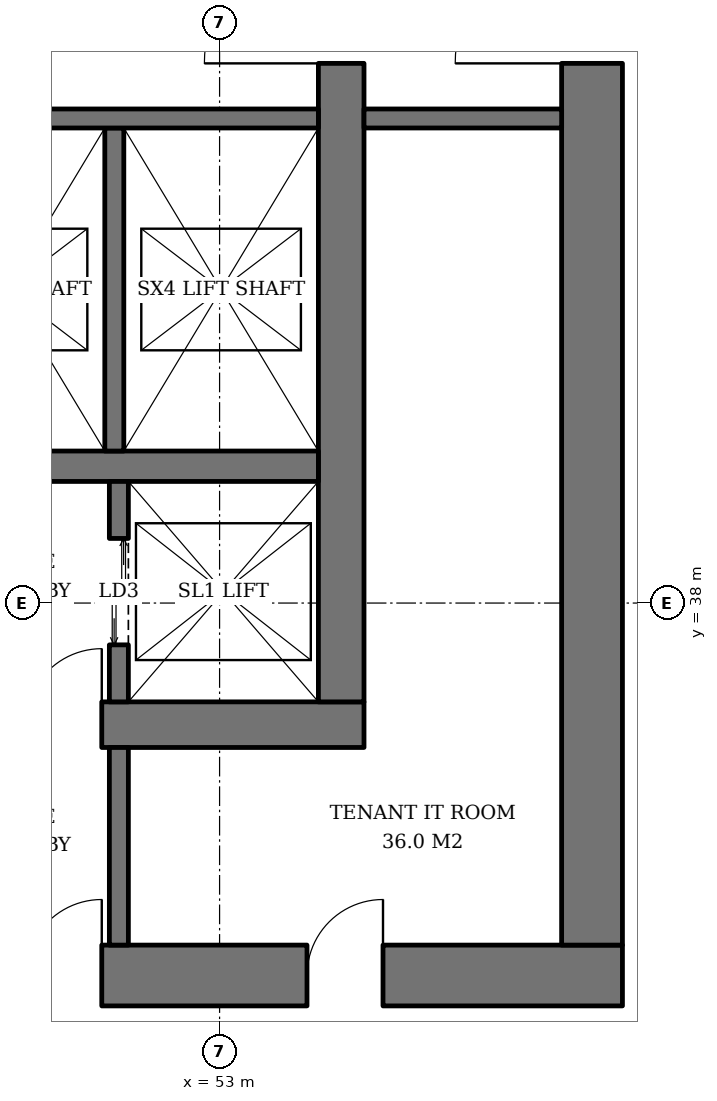
"""IFC4 building model, lengths in metres.
Left out: names, types, materials, properties, quantities, classifications, styles, units other than length and angle.
Written with IfcOpenShell. Run it as: python <this file> out.ifc"""

import sys

from ifc_helpers import new_model, si_unit, direction, frame, frame_2d, origin, place, context, subcontext, project, spatial, rectangle, extrude, element, fill, save


model = new_model("IFC4")
c1 = context("Model", 3, precision=1e-05, world=origin(), true_north=direction((0.0, 1.0)))
c2 = subcontext(c1, "Body", "Model", "MODEL_VIEW")
j1 = project(units=[si_unit("LENGTHUNIT", "METRE"), si_unit("PLANEANGLEUNIT", "RADIAN")], contexts=[c1])
p1 = place(None, origin())
s1 = spatial("IfcSite", under=j1, at=p1, CompositionType="ELEMENT")
p2 = place(p1, origin())
s2 = spatial("IfcBuilding", under=s1, at=p2, CompositionType="ELEMENT")
p3 = place(p2, frame((0.0, 0.0, 36.2)))
s3 = spatial("IfcBuildingStorey", under=s2, at=p3, CompositionType="ELEMENT", Elevation=36.2)
p4 = place(p3, frame((35.1, 36.4, 0.0), z_axis=(0.0, 0.0, 1.0), x_axis=(1.0, 0.0, 0.0)))
e1 = element("IfcWall", 1, at=p4, inside=s3, PredefinedType="SHEAR", context=c2, shape_type="SweptSolid", body=[
    extrude(rectangle(XDim=19.8, YDim=0.6, at=frame_2d((9.9, 0.0))), origin(), (0.0, 0.0, 1.0), 3.8),
])
p5 = place(p4, frame((3.9, 0.0, 0.0)))
e2 = element("IfcOpeningElement", 2, at=p5, cuts=e1, PredefinedType="OPENING", context=c2, shape_type="SweptSolid", body=[
    extrude(rectangle(XDim=1.0, YDim=2.1, at=frame_2d((0.5, 1.05))), frame((0.0, 0.31, 0.0), z_axis=(0.0, -1.0, 0.0), x_axis=(1.0, 0.0, 0.0)), (0.0, 0.0, 1.0), 0.62),
])
p6 = place(p4, frame((15.35, 0.0, 0.0)))
e3 = element("IfcOpeningElement", 3, at=p6, cuts=e1, PredefinedType="OPENING", context=c2, shape_type="SweptSolid", body=[
    extrude(rectangle(XDim=1.0, YDim=2.1, at=frame_2d((0.5, 1.05))), frame((0.0, 0.31, 0.0), z_axis=(0.0, -1.0, 0.0), x_axis=(1.0, 0.0, 0.0)), (0.0, 0.0, 1.0), 0.62),
])
p7 = place(p3, frame((54.6, 36.7, 0.0), z_axis=(0.0, 0.0, 1.0), x_axis=(0.0, 1.0, 0.0)))
e4 = element("IfcWall", 4, at=p7, inside=s3, PredefinedType="SHEAR", context=c2, shape_type="SweptSolid", body=[
    extrude(rectangle(XDim=18.6, YDim=0.6, at=frame_2d((9.3, 0.0))), origin(), (0.0, 0.0, 1.0), 3.8),
])
p8 = place(p7, frame((8.4, 0.0, 0.0)))
e5 = element("IfcOpeningElement", 5, at=p8, cuts=e4, PredefinedType="OPENING", context=c2, shape_type="SweptSolid", body=[
    extrude(rectangle(XDim=1.8, YDim=2.4, at=frame_2d((0.9, 1.2))), frame((0.0, 0.31, 0.0), z_axis=(0.0, -1.0, 0.0), x_axis=(1.0, 0.0, 0.0)), (0.0, 0.0, 1.0), 0.62),
])
p9 = place(p3, frame((31.7, 33.1, 0.0), z_axis=(0.0, 0.0, 1.0), x_axis=(1.0, 0.0, 0.0)))
e6 = element("IfcWall", 6, at=p9, inside=s3, PredefinedType="SHEAR", context=c2, shape_type="SweptSolid", body=[
    extrude(rectangle(XDim=26.6, YDim=0.8, at=frame_2d((13.3, 0.0))), origin(), (0.0, 0.0, 1.0), 3.8),
])
p10 = place(p9, frame((7.3, 0.0, 0.0)))
e7 = element("IfcOpeningElement", 7, at=p10, cuts=e6, PredefinedType="OPENING", context=c2, shape_type="SweptSolid", body=[
    extrude(rectangle(XDim=1.0, YDim=2.1, at=frame_2d((0.5, 1.05))), frame((0.0, 0.41, 0.0), z_axis=(0.0, -1.0, 0.0), x_axis=(1.0, 0.0, 0.0)), (0.0, 0.0, 1.0), 0.82),
])
p11 = place(p9, frame((18.75, 0.0, 0.0)))
e8 = element("IfcOpeningElement", 8, at=p11, cuts=e6, PredefinedType="OPENING", context=c2, shape_type="SweptSolid", body=[
    extrude(rectangle(XDim=1.0, YDim=2.1, at=frame_2d((0.5, 1.05))), frame((0.0, 0.41, 0.0), z_axis=(0.0, -1.0, 0.0), x_axis=(1.0, 0.0, 0.0)), (0.0, 0.0, 1.0), 0.82),
])
p12 = place(p9, frame((3.25, 0.0, 0.0)))
e9 = element("IfcOpeningElement", 9, at=p12, cuts=e6, PredefinedType="OPENING", context=c2, shape_type="SweptSolid", body=[
    extrude(rectangle(XDim=1.0, YDim=2.1, at=frame_2d((0.5, 1.05))), frame((0.0, 0.41, 0.0), z_axis=(0.0, -1.0, 0.0), x_axis=(1.0, 0.0, 0.0)), (0.0, 0.0, 1.0), 0.82),
])
p13 = place(p9, frame((10.42, 0.0, 0.0)))
e10 = element("IfcOpeningElement", 10, at=p13, cuts=e6, PredefinedType="OPENING", context=c2, shape_type="SweptSolid", body=[
    extrude(rectangle(XDim=1.0, YDim=2.1, at=frame_2d((0.5, 1.05))), frame((0.0, 0.41, 0.0), z_axis=(0.0, -1.0, 0.0), x_axis=(1.0, 0.0, 0.0)), (0.0, 0.0, 1.0), 0.82),
])
p14 = place(p9, frame((14.46, 0.0, 0.0)))
e11 = element("IfcOpeningElement", 11, at=p14, cuts=e6, PredefinedType="OPENING", context=c2, shape_type="SweptSolid", body=[
    extrude(rectangle(XDim=1.0, YDim=2.1, at=frame_2d((0.5, 1.05))), frame((0.0, 0.41, 0.0), z_axis=(0.0, -1.0, 0.0), x_axis=(1.0, 0.0, 0.0)), (0.0, 0.0, 1.0), 0.82),
])
p15 = place(p9, frame((22.45, 0.0, 0.0)))
e12 = element("IfcOpeningElement", 12, at=p15, cuts=e6, PredefinedType="OPENING", context=c2, shape_type="SweptSolid", body=[
    extrude(rectangle(XDim=1.0, YDim=2.1, at=frame_2d((0.5, 1.05))), frame((0.0, 0.41, 0.0), z_axis=(0.0, -1.0, 0.0), x_axis=(1.0, 0.0, 0.0)), (0.0, 0.0, 1.0), 0.82),
])
p16 = place(p3, frame((57.9, 33.5, 0.0), z_axis=(0.0, 0.0, 1.0), x_axis=(0.0, 1.0, 0.0)))
e13 = element("IfcWall", 13, at=p16, inside=s3, PredefinedType="SHEAR", context=c2, shape_type="SweptSolid", body=[
    extrude(rectangle(XDim=25.0, YDim=0.8, at=frame_2d((12.5, 0.0))), origin(), (0.0, 0.0, 1.0), 3.8),
])
p17 = place(p16, frame((11.6, 0.0, 0.0)))
e14 = element("IfcOpeningElement", 14, at=p17, cuts=e13, PredefinedType="OPENING", context=c2, shape_type="SweptSolid", body=[
    extrude(rectangle(XDim=1.8, YDim=2.4, at=frame_2d((0.9, 1.2))), frame((0.0, 0.41, 0.0), z_axis=(0.0, -1.0, 0.0), x_axis=(1.0, 0.0, 0.0)), (0.0, 0.0, 1.0), 0.82),
])
p18 = place(p3, frame((35.7, 39.8, 0.0), z_axis=(0.0, 0.0, 1.0), x_axis=(1.0, 0.0, 0.0)))
e15 = element("IfcWall", 15, at=p18, inside=s3, PredefinedType="SHEAR", context=c2, shape_type="SweptSolid", body=[
    extrude(rectangle(XDim=18.6, YDim=0.4, at=frame_2d((9.3, 0.0))), origin(), (0.0, 0.0, 1.0), 3.8),
])
p19 = place(p3, frame((51.675, 36.7, 0.0), z_axis=(0.0, 0.0, 1.0), x_axis=(0.0, 1.0, 0.0)))
e16 = element("IfcWall", 16, at=p19, inside=s3, PredefinedType="SHEAR", context=c2, shape_type="SweptSolid", body=[
    extrude(rectangle(XDim=2.9, YDim=0.25, at=frame_2d((1.45, 0.0))), origin(), (0.0, 0.0, 1.0), 3.8),
])
p20 = place(p19, frame((0.75, 0.0, 0.0)))
e17 = element("IfcOpeningElement", 17, at=p20, cuts=e16, PredefinedType="OPENING", context=c2, shape_type="SweptSolid", body=[
    extrude(rectangle(XDim=1.4, YDim=2.4, at=frame_2d((0.7, 1.2))), frame((0.0, 0.135, 0.0), z_axis=(0.0, -1.0, 0.0), x_axis=(1.0, 0.0, 0.0)), (0.0, 0.0, 1.0), 0.27),
])
p21 = place(p3, frame((51.615, 44.25, 0.0), z_axis=(0.0, 0.0, 1.0), x_axis=(0.0, -1.0, 0.0)))
e18 = element("IfcWall", 18, at=p21, inside=s3, PredefinedType="SHEAR", context=c2, shape_type="SweptSolid", body=[
    extrude(rectangle(XDim=4.25, YDim=0.25, at=frame_2d((2.125, 0.0))), origin(), (0.0, 0.0, 1.0), 3.8),
])
p22 = place(p3, frame((48.93, 44.375, 0.0), z_axis=(0.0, 0.0, 1.0), x_axis=(1.0, 0.0, 0.0)))
e19 = element("IfcWall", 19, at=p22, inside=s3, PredefinedType="SHEAR", context=c2, shape_type="SweptSolid", body=[
    extrude(rectangle(XDim=5.37, YDim=0.25, at=frame_2d((2.685, 0.0))), origin(), (0.0, 0.0, 1.0), 3.8),
])
for number, where, z_axis, x_axis in (
    (20, (54.9, 44.375, 0.0), (0.0, 0.0, 1.0), (1.0, 0.0, 0.0)),
    (21, (51.675, 33.5, 0.0), (0.0, 0.0, 1.0), (0.0, 1.0, 0.0)),
):
    element("IfcWall", number, at=place(p3, frame(where, z_axis=z_axis, x_axis=x_axis)), inside=s3, PredefinedType="SOLIDWALL", context=c2, shape_type="SweptSolid", body=[
        extrude(rectangle(XDim=2.6, YDim=0.25, at=frame_2d((1.3, 0.0))), origin(), (0.0, 0.0, 1.0), 3.62),
    ])
p23 = place(p20, origin())
e22 = element("IfcDoor", 22, at=p23, inside=s3, OperationType="DOUBLE_DOOR_SLIDING", PredefinedType="DOOR", context=c2, shape_type="SweptSolid", body=[
    extrude(rectangle(XDim=1.4, YDim=2.4, at=frame_2d((0.7, 1.2))), frame((0.0, 0.025, 0.0), z_axis=(0.0, -1.0, 0.0), x_axis=(1.0, 0.0, 0.0)), (0.0, 0.0, 1.0), 0.05),
])
fill(e17, e22)
p24 = place(p8, origin())
e23 = element("IfcDoor", 23, at=p24, inside=s3, OperationType="DOUBLE_DOOR_SINGLE_SWING", PredefinedType="DOOR", context=c2, shape_type="SweptSolid", body=[
    extrude(rectangle(XDim=1.8, YDim=2.4, at=frame_2d((0.9, 1.2))), frame((0.0, 0.025, 0.0), z_axis=(0.0, -1.0, 0.0), x_axis=(1.0, 0.0, 0.0)), (0.0, 0.0, 1.0), 0.05),
])
fill(e5, e23)
p25 = place(p6, origin())
e24 = element("IfcDoor", 24, at=p25, inside=s3, OperationType="SINGLE_SWING_RIGHT", PredefinedType="DOOR", context=c2, shape_type="SweptSolid", body=[
    extrude(rectangle(XDim=1.0, YDim=2.1, at=frame_2d((0.5, 1.05))), frame((0.0, 0.025, 0.0), z_axis=(0.0, -1.0, 0.0), x_axis=(1.0, 0.0, 0.0)), (0.0, 0.0, 1.0), 0.05),
])
fill(e3, e24)
p26 = place(p17, origin())
e25 = element("IfcDoor", 25, at=p26, inside=s3, OperationType="DOUBLE_DOOR_SINGLE_SWING", PredefinedType="DOOR", context=c2, shape_type="SweptSolid", body=[
    extrude(rectangle(XDim=1.8, YDim=2.4, at=frame_2d((0.9, 1.2))), frame((0.0, 0.025, 0.0), z_axis=(0.0, -1.0, 0.0), x_axis=(1.0, 0.0, 0.0)), (0.0, 0.0, 1.0), 0.05),
])
fill(e14, e25)
p27 = place(p11, origin())
e26 = element("IfcDoor", 26, at=p27, inside=s3, OperationType="SINGLE_SWING_RIGHT", PredefinedType="DOOR", context=c2, shape_type="SweptSolid", body=[
    extrude(rectangle(XDim=1.0, YDim=2.1, at=frame_2d((0.5, 1.05))), frame((0.0, 0.025, 0.0), z_axis=(0.0, -1.0, 0.0), x_axis=(1.0, 0.0, 0.0)), (0.0, 0.0, 1.0), 0.05),
])
fill(e8, e26)
p28 = place(p15, origin())
e27 = element("IfcDoor", 27, at=p28, inside=s3, OperationType="SINGLE_SWING_RIGHT", PredefinedType="DOOR", context=c2, shape_type="SweptSolid", body=[
    extrude(rectangle(XDim=1.0, YDim=2.1, at=frame_2d((0.5, 1.05))), frame((0.0, 0.39, 0.0), z_axis=(0.0, -1.0, 0.0), x_axis=(1.0, 0.0, 0.0)), (0.0, 0.0, 1.0), 0.05),
])
fill(e12, e27)
save(model, sys.argv[1])
